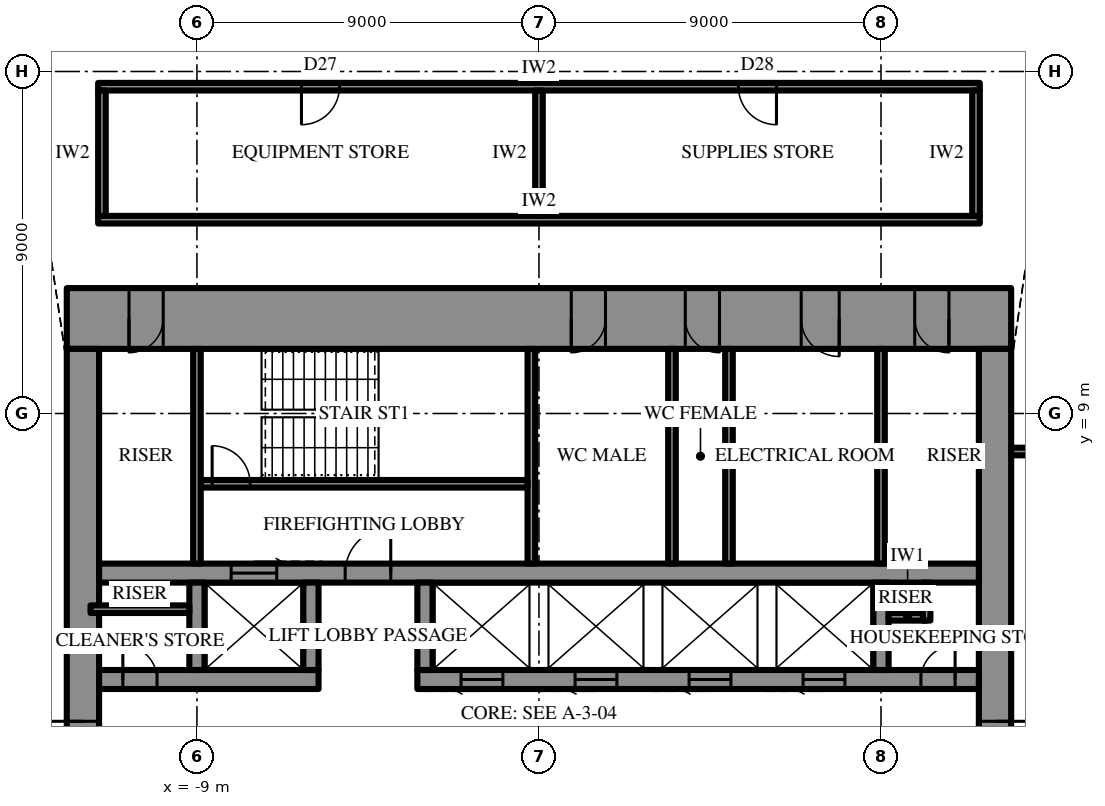
"""IFC4 building model, lengths in metres.
Left out: names, types, materials, properties, quantities, classifications, styles, units other than length and angle.
Written with IfcOpenShell. Run it as: python <this file> out.ifc"""

import sys

from ifc_helpers import new_model, si_unit, direction, frame, frame_2d, origin, place, context, subcontext, project, spatial, rectangle, extrude, element, fill, save


model = new_model("IFC4")
c1 = context("Model", 3, precision=1e-05, world=origin(), true_north=direction((0.0, 1.0)))
c2 = subcontext(c1, "Body", "Model", "MODEL_VIEW")
j1 = project(units=[si_unit("LENGTHUNIT", "METRE"), si_unit("PLANEANGLEUNIT", "RADIAN")], contexts=[c1])
p1 = place(None, origin())
s1 = spatial("IfcSite", under=j1, at=p1, CompositionType="ELEMENT")
p2 = place(p1, origin())
s2 = spatial("IfcBuilding", under=s1, at=p2, CompositionType="ELEMENT")
p3 = place(p2, frame((0.0, 0.0, 353.5)))
s3 = spatial("IfcBuildingStorey", under=s2, at=p3, CompositionType="ELEMENT", Elevation=353.5)
p4 = place(p3, frame((-12.425, 11.5, 0.0), z_axis=(0.0, 0.0, 1.0), x_axis=(1.0, 0.0, 0.0)))
e1 = element("IfcWall", 1, at=p4, inside=s3, PredefinedType="SHEAR", context=c2, shape_type="SweptSolid", body=[
    extrude(rectangle(XDim=24.85, YDim=1.6, at=frame_2d((12.425, 0.0))), origin(), (0.0, 0.0, 1.0), 4.2),
])
p5 = place(p4, frame((13.275, 0.0, 0.0)))
e2 = element("IfcOpeningElement", 2, at=p5, cuts=e1, PredefinedType="OPENING", context=c2, shape_type="SweptSolid", body=[
    extrude(rectangle(XDim=0.9, YDim=2.2, at=frame_2d((0.45, 1.1))), frame((0.0, 0.81, 0.0), z_axis=(0.0, -1.0, 0.0), x_axis=(1.0, 0.0, 0.0)), (0.0, 0.0, 1.0), 1.62),
])
p6 = place(p4, frame((16.275, 0.0, 0.0)))
e3 = element("IfcOpeningElement", 3, at=p6, cuts=e1, PredefinedType="OPENING", context=c2, shape_type="SweptSolid", body=[
    extrude(rectangle(XDim=0.9, YDim=2.2, at=frame_2d((0.45, 1.1))), frame((0.0, 0.81, 0.0), z_axis=(0.0, -1.0, 0.0), x_axis=(1.0, 0.0, 0.0)), (0.0, 0.0, 1.0), 1.62),
])
p7 = place(p4, frame((19.325, 0.0, 0.0)))
e4 = element("IfcOpeningElement", 4, at=p7, cuts=e1, PredefinedType="OPENING", context=c2, shape_type="SweptSolid", body=[
    extrude(rectangle(XDim=1.0, YDim=2.2, at=frame_2d((0.5, 1.1))), frame((0.0, 0.81, 0.0), z_axis=(0.0, -1.0, 0.0), x_axis=(1.0, 0.0, 0.0)), (0.0, 0.0, 1.0), 1.62),
])
p8 = place(p4, frame((1.637, 0.0, 0.0)))
e5 = element("IfcOpeningElement", 5, at=p8, cuts=e1, PredefinedType="OPENING", context=c2, shape_type="SweptSolid", body=[
    extrude(rectangle(XDim=0.9, YDim=2.2, at=frame_2d((0.45, 1.1))), frame((0.0, 0.81, 0.0), z_axis=(0.0, -1.0, 0.0), x_axis=(1.0, 0.0, 0.0)), (0.0, 0.0, 1.0), 1.62),
])
p9 = place(p4, frame((22.312, 0.0, 0.0)))
e6 = element("IfcOpeningElement", 6, at=p9, cuts=e1, PredefinedType="OPENING", context=c2, shape_type="SweptSolid", body=[
    extrude(rectangle(XDim=0.9, YDim=2.2, at=frame_2d((0.45, 1.1))), frame((0.0, 0.81, 0.0), z_axis=(0.0, -1.0, 0.0), x_axis=(1.0, 0.0, 0.0)), (0.0, 0.0, 1.0), 1.62),
])
p10 = place(p3, frame((12.0, -10.7, 0.0), z_axis=(0.0, 0.0, 1.0), x_axis=(0.0, 1.0, 0.0)))
e7 = element("IfcWall", 7, at=p10, inside=s3, PredefinedType="SHEAR", context=c2, shape_type="SweptSolid", body=[
    extrude(rectangle(XDim=21.4, YDim=0.85, at=frame_2d((10.7, 0.0))), origin(), (0.0, 0.0, 1.0), 4.2),
])
p11 = place(p10, frame((9.8, 0.0, 0.0)))
e8 = element("IfcOpeningElement", 8, at=p11, cuts=e7, PredefinedType="OPENING", context=c2, shape_type="SweptSolid", body=[
    extrude(rectangle(XDim=1.8, YDim=2.4, at=frame_2d((0.9, 1.2))), frame((0.0, 0.435, 0.0), z_axis=(0.0, -1.0, 0.0), x_axis=(1.0, 0.0, 0.0)), (0.0, 0.0, 1.0), 0.87),
])
p12 = place(p3, frame((-12.0, 10.7, 0.0), z_axis=(0.0, 0.0, 1.0), x_axis=(0.0, -1.0, 0.0)))
e9 = element("IfcWall", 9, at=p12, inside=s3, PredefinedType="SHEAR", context=c2, shape_type="SweptSolid", body=[
    extrude(rectangle(XDim=21.4, YDim=0.85, at=frame_2d((10.7, 0.0))), origin(), (0.0, 0.0, 1.0), 4.2),
])
p13 = place(p12, frame((9.8, 0.0, 0.0)))
e10 = element("IfcOpeningElement", 10, at=p13, cuts=e9, PredefinedType="OPENING", context=c2, shape_type="SweptSolid", body=[
    extrude(rectangle(XDim=1.8, YDim=2.4, at=frame_2d((0.9, 1.2))), frame((0.0, 0.435, 0.0), z_axis=(0.0, -1.0, 0.0), x_axis=(1.0, 0.0, 0.0)), (0.0, 0.0, 1.0), 0.87),
])
p14 = place(p3, frame((-11.575, 2.0, 0.0), z_axis=(0.0, 0.0, 1.0), x_axis=(1.0, 0.0, 0.0)))
e11 = element("IfcWall", 11, at=p14, inside=s3, PredefinedType="SHEAR", context=c2, shape_type="SweptSolid", body=[
    extrude(rectangle(XDim=5.775, YDim=0.5, at=frame_2d((2.887, 0.0))), origin(), (0.0, 0.0, 1.0), 4.2),
])
p15 = place(p14, frame((0.625, 0.0, 0.0)))
e12 = element("IfcOpeningElement", 12, at=p15, cuts=e11, PredefinedType="OPENING", context=c2, shape_type="SweptSolid", body=[
    extrude(rectangle(XDim=0.9, YDim=2.2, at=frame_2d((0.45, 1.1))), frame((0.0, 0.26, 0.0), z_axis=(0.0, -1.0, 0.0), x_axis=(1.0, 0.0, 0.0)), (0.0, 0.0, 1.0), 0.52),
])
p16 = place(p3, frame((-3.2, 2.0, 0.0), z_axis=(0.0, 0.0, 1.0), x_axis=(1.0, 0.0, 0.0)))
e13 = element("IfcWall", 13, at=p16, inside=s3, PredefinedType="SHEAR", context=c2, shape_type="SweptSolid", body=[
    extrude(rectangle(XDim=14.775, YDim=0.5, at=frame_2d((7.387, 0.0))), origin(), (0.0, 0.0, 1.0), 4.2),
])
p17 = place(p16, frame((13.25, 0.0, 0.0)))
e14 = element("IfcOpeningElement", 14, at=p17, cuts=e13, PredefinedType="OPENING", context=c2, shape_type="SweptSolid", body=[
    extrude(rectangle(XDim=0.9, YDim=2.2, at=frame_2d((0.45, 1.1))), frame((0.0, 0.26, 0.0), z_axis=(0.0, -1.0, 0.0), x_axis=(1.0, 0.0, 0.0)), (0.0, 0.0, 1.0), 0.52),
])
p18 = place(p16, frame((1.15, 0.0, 0.0)))
e15 = element("IfcOpeningElement", 15, at=p18, cuts=e13, PredefinedType="OPENING", context=c2, shape_type="SweptSolid", body=[
    extrude(rectangle(XDim=1.1, YDim=2.2, at=frame_2d((0.55, 1.1))), frame((0.0, 0.26, 0.0), z_axis=(0.0, -1.0, 0.0), x_axis=(1.0, 0.0, 0.0)), (0.0, 0.0, 1.0), 0.52),
])
p19 = place(p16, frame((4.15, 0.0, 0.0)))
e16 = element("IfcOpeningElement", 16, at=p19, cuts=e13, PredefinedType="OPENING", context=c2, shape_type="SweptSolid", body=[
    extrude(rectangle(XDim=1.1, YDim=2.2, at=frame_2d((0.55, 1.1))), frame((0.0, 0.26, 0.0), z_axis=(0.0, -1.0, 0.0), x_axis=(1.0, 0.0, 0.0)), (0.0, 0.0, 1.0), 0.52),
])
p20 = place(p16, frame((7.15, 0.0, 0.0)))
e17 = element("IfcOpeningElement", 17, at=p20, cuts=e13, PredefinedType="OPENING", context=c2, shape_type="SweptSolid", body=[
    extrude(rectangle(XDim=1.1, YDim=2.2, at=frame_2d((0.55, 1.1))), frame((0.0, 0.26, 0.0), z_axis=(0.0, -1.0, 0.0), x_axis=(1.0, 0.0, 0.0)), (0.0, 0.0, 1.0), 0.52),
])
p21 = place(p16, frame((10.15, 0.0, 0.0)))
e18 = element("IfcOpeningElement", 18, at=p21, cuts=e13, PredefinedType="OPENING", context=c2, shape_type="SweptSolid", body=[
    extrude(rectangle(XDim=1.1, YDim=2.2, at=frame_2d((0.55, 1.1))), frame((0.0, 0.26, 0.0), z_axis=(0.0, -1.0, 0.0), x_axis=(1.0, 0.0, 0.0)), (0.0, 0.0, 1.0), 0.52),
])
p22 = place(p3, frame((-11.575, 4.8, 0.0), z_axis=(0.0, 0.0, 1.0), x_axis=(1.0, 0.0, 0.0)))
e19 = element("IfcWall", 19, at=p22, inside=s3, PredefinedType="SHEAR", context=c2, shape_type="SweptSolid", body=[
    extrude(rectangle(XDim=23.15, YDim=0.5, at=frame_2d((11.575, 0.0))), origin(), (0.0, 0.0, 1.0), 4.2),
])
p23 = place(p22, frame((6.475, 0.0, 0.0)))
e20 = element("IfcOpeningElement", 20, at=p23, cuts=e19, PredefinedType="OPENING", context=c2, shape_type="SweptSolid", body=[
    extrude(rectangle(XDim=1.2, YDim=2.2, at=frame_2d((0.6, 1.1))), frame((0.0, 0.26, 0.0), z_axis=(0.0, -1.0, 0.0), x_axis=(1.0, 0.0, 0.0)), (0.0, 0.0, 1.0), 0.52),
])
p24 = place(p22, frame((3.475, 0.0, 0.0)))
e21 = element("IfcOpeningElement", 21, at=p24, cuts=e19, PredefinedType="OPENING", context=c2, shape_type="SweptSolid", body=[
    extrude(rectangle(XDim=1.2, YDim=2.2, at=frame_2d((0.6, 1.1))), frame((0.0, 0.26, 0.0), z_axis=(0.0, -1.0, 0.0), x_axis=(1.0, 0.0, 0.0)), (0.0, 0.0, 1.0), 0.52),
])
for number, where, z_axis, x_axis in (
    (22, (-9.0, 2.25, 0.0), (0.0, 0.0, 1.0), (0.0, 1.0, 0.0)),
    (23, (-6.0, 2.25, 0.0), (0.0, 0.0, 1.0), (0.0, 1.0, 0.0)),
    (24, (-3.0, 2.25, 0.0), (0.0, 0.0, 1.0), (0.0, 1.0, 0.0)),
    (25, (9.0, 2.25, 0.0), (0.0, 0.0, 1.0), (0.0, 1.0, 0.0)),
):
    element("IfcWall", number, at=place(p3, frame(where, z_axis=z_axis, x_axis=x_axis)), inside=s3, PredefinedType="SHEAR", context=c2, shape_type="SweptSolid", body=[
        extrude(rectangle(XDim=2.3, YDim=0.4, at=frame_2d((1.15, 0.0))), origin(), (0.0, 0.0, 1.0), 4.2),
    ])
p25 = place(p3, frame((-0.2, 5.05, 0.0), z_axis=(0.0, 0.0, 1.0), x_axis=(0.0, 1.0, 0.0)))
e26 = element("IfcWall", 26, at=p25, inside=s3, PredefinedType="SHEAR", context=c2, shape_type="SweptSolid", body=[
    extrude(rectangle(XDim=5.65, YDim=0.2, at=frame_2d((2.825, 0.0))), origin(), (0.0, 0.0, 1.0), 4.2),
])
p26 = place(p3, frame((-8.9, 7.15, 0.0), z_axis=(0.0, 0.0, 1.0), x_axis=(1.0, 0.0, 0.0)))
e27 = element("IfcWall", 27, at=p26, inside=s3, PredefinedType="SHEAR", context=c2, shape_type="SweptSolid", body=[
    extrude(rectangle(XDim=8.6, YDim=0.2, at=frame_2d((4.3, 0.0))), origin(), (0.0, 0.0, 1.0), 4.2),
])
p27 = place(p26, frame((0.3, 0.0, 0.0)))
e28 = element("IfcOpeningElement", 28, at=p27, cuts=e27, PredefinedType="OPENING", context=c2, shape_type="SweptSolid", body=[
    extrude(rectangle(XDim=1.0, YDim=2.2, at=frame_2d((0.5, 1.1))), frame((0.0, 0.11, 0.0), z_axis=(0.0, -1.0, 0.0), x_axis=(1.0, 0.0, 0.0)), (0.0, 0.0, 1.0), 0.22),
])
for number, where, z_axis, x_axis in (
    (29, (-9.0, 5.05, 0.0), (0.0, 0.0, 1.0), (0.0, 1.0, 0.0)),
    (30, (9.0, 5.05, 0.0), (0.0, 0.0, 1.0), (0.0, 1.0, 0.0)),
    (31, (3.5, 5.05, 0.0), (0.0, 0.0, 1.0), (0.0, 1.0, 0.0)),
    (32, (5.0, 5.05, 0.0), (0.0, 0.0, 1.0), (0.0, 1.0, 0.0)),
):
    element("IfcWall", number, at=place(p3, frame(where, z_axis=z_axis, x_axis=x_axis)), inside=s3, PredefinedType="PARTITIONING", context=c2, shape_type="SweptSolid", body=[
        extrude(rectangle(XDim=5.65, YDim=0.2, at=frame_2d((2.825, 0.0))), origin(), (0.0, 0.0, 1.0), 4.0),
    ])
p28 = place(p3, frame((-11.8, 3.85, 0.0), z_axis=(0.0, 0.0, 1.0), x_axis=(1.0, 0.0, 0.0)))
e33 = element("IfcWall", 33, at=p28, inside=s3, PredefinedType="PARTITIONING", context=c2, shape_type="SweptSolid", body=[
    extrude(rectangle(XDim=2.6, YDim=0.2, at=frame_2d((1.3, 0.0))), origin(), (0.0, 0.0, 1.0), 4.0),
])
for number, where, z_axis, x_axis in (
    (34, (9.2, 3.65, 0.0), (0.0, 0.0, 1.0), (1.0, 0.0, 0.0)),
    (35, (10.2, 3.55, 0.0), (0.0, 0.0, 1.0), (0.0, 1.0, 0.0)),
):
    element("IfcWall", number, at=place(p3, frame(where, z_axis=z_axis, x_axis=x_axis)), inside=s3, PredefinedType="PARTITIONING", context=c2, shape_type="SweptSolid", body=[
        extrude(rectangle(XDim=1.0, YDim=0.2, at=frame_2d((0.5, 0.0))), origin(), (0.0, 0.0, 1.0), 4.0),
    ])
p29 = place(p3, frame((-11.6, 14.1, 0.0), z_axis=(0.0, 0.0, 1.0), x_axis=(1.0, 0.0, 0.0)))
e36 = element("IfcWall", 36, at=p29, inside=s3, PredefinedType="PARTITIONING", context=c2, shape_type="SweptSolid", body=[
    extrude(rectangle(XDim=23.2, YDim=0.2, at=frame_2d((11.6, 0.0))), origin(), (0.0, 0.0, 1.0), 4.0),
])
p30 = place(p3, frame((-11.6, 17.6, 0.0), z_axis=(0.0, 0.0, 1.0), x_axis=(1.0, 0.0, 0.0)))
e37 = element("IfcWall", 37, at=p30, inside=s3, PredefinedType="PARTITIONING", context=c2, shape_type="SweptSolid", body=[
    extrude(rectangle(XDim=23.2, YDim=0.2, at=frame_2d((11.6, 0.0))), origin(), (0.0, 0.0, 1.0), 4.0),
])
p31 = place(p30, frame((5.35, 0.0, 0.0)))
e38 = element("IfcOpeningElement", 38, at=p31, cuts=e37, PredefinedType="OPENING", context=c2, shape_type="SweptSolid", body=[
    extrude(rectangle(XDim=1.0, YDim=2.2, at=frame_2d((0.5, 1.1))), frame((0.0, 0.11, 0.0), z_axis=(0.0, -1.0, 0.0), x_axis=(1.0, 0.0, 0.0)), (0.0, 0.0, 1.0), 0.22),
])
p32 = place(p30, frame((16.85, 0.0, 0.0)))
e39 = element("IfcOpeningElement", 39, at=p32, cuts=e37, PredefinedType="OPENING", context=c2, shape_type="SweptSolid", body=[
    extrude(rectangle(XDim=1.0, YDim=2.2, at=frame_2d((0.5, 1.1))), frame((0.0, 0.11, 0.0), z_axis=(0.0, -1.0, 0.0), x_axis=(1.0, 0.0, 0.0)), (0.0, 0.0, 1.0), 0.22),
])
p33 = place(p3, frame((-11.5, 14.2, 0.0), z_axis=(0.0, 0.0, 1.0), x_axis=(0.0, 1.0, 0.0)))
e40 = element("IfcWall", 40, at=p33, inside=s3, PredefinedType="PARTITIONING", context=c2, shape_type="SweptSolid", body=[
    extrude(rectangle(XDim=3.3, YDim=0.2, at=frame_2d((1.65, 0.0))), origin(), (0.0, 0.0, 1.0), 4.0),
])
p34 = place(p3, frame((0.0, 14.2, 0.0), z_axis=(0.0, 0.0, 1.0), x_axis=(0.0, 1.0, 0.0)))
e41 = element("IfcWall", 41, at=p34, inside=s3, PredefinedType="PARTITIONING", context=c2, shape_type="SweptSolid", body=[
    extrude(rectangle(XDim=3.3, YDim=0.2, at=frame_2d((1.65, 0.0))), origin(), (0.0, 0.0, 1.0), 2.992),
])
p35 = place(p3, frame((11.5, 14.2, 0.0), z_axis=(0.0, 0.0, 1.0), x_axis=(0.0, 1.0, 0.0)))
e42 = element("IfcWall", 42, at=p35, inside=s3, PredefinedType="PARTITIONING", context=c2, shape_type="SweptSolid", body=[
    extrude(rectangle(XDim=3.3, YDim=0.2, at=frame_2d((1.65, 0.0))), origin(), (0.0, 0.0, 1.0), 4.0),
])
p36 = place(p3, frame((12.425, 8.0, 0.0), z_axis=(0.0, 0.0, 1.0), x_axis=(1.0, 0.0, 0.0)))
e43 = element("IfcWall", 43, at=p36, inside=s3, PredefinedType="PARTITIONING", context=c2, shape_type="SweptSolid", body=[
    extrude(rectangle(XDim=13.59, YDim=0.2, at=frame_2d((6.795, 0.0))), origin(), (0.0, 0.0, 1.0), 4.0),
])
p37 = place(p36, frame((0.859, 0.0, 0.0)))
e44 = element("IfcOpeningElement", 44, at=p37, cuts=e43, PredefinedType="OPENING", context=c2, shape_type="SweptSolid", body=[
    extrude(rectangle(XDim=1.0, YDim=2.2, at=frame_2d((0.5, 1.1))), frame((0.0, 0.11, 0.0), z_axis=(0.0, -1.0, 0.0), x_axis=(1.0, 0.0, 0.0)), (0.0, 0.0, 1.0), 0.22),
])
p38 = place(p11, frame((1.8, 0.0, 0.0), z_axis=(0.0, 0.0, 1.0), x_axis=(-1.0, 0.0, 0.0)))
e45 = element("IfcDoor", 45, at=p38, inside=s3, OperationType="DOUBLE_DOOR_SINGLE_SWING", PredefinedType="DOOR", context=c2, shape_type="SweptSolid", body=[
    extrude(rectangle(XDim=1.8, YDim=2.4, at=frame_2d((0.9, 1.2))), frame((0.0, 0.025, 0.0), z_axis=(0.0, -1.0, 0.0), x_axis=(1.0, 0.0, 0.0)), (0.0, 0.0, 1.0), 0.05),
])
fill(e8, e45)
p39 = place(p13, frame((1.8, 0.0, 0.0), z_axis=(0.0, 0.0, 1.0), x_axis=(-1.0, 0.0, 0.0)))
e46 = element("IfcDoor", 46, at=p39, inside=s3, OperationType="DOUBLE_DOOR_SINGLE_SWING", PredefinedType="DOOR", context=c2, shape_type="SweptSolid", body=[
    extrude(rectangle(XDim=1.8, YDim=2.4, at=frame_2d((0.9, 1.2))), frame((0.0, 0.025, 0.0), z_axis=(0.0, -1.0, 0.0), x_axis=(1.0, 0.0, 0.0)), (0.0, 0.0, 1.0), 0.05),
])
fill(e10, e46)
p40 = place(p23, origin())
e47 = element("IfcDoor", 47, at=p40, inside=s3, OperationType="SINGLE_SWING_LEFT", PredefinedType="DOOR", context=c2, shape_type="SweptSolid", body=[
    extrude(rectangle(XDim=1.2, YDim=2.2, at=frame_2d((0.6, 1.1))), frame((0.0, 0.025, 0.0), z_axis=(0.0, -1.0, 0.0), x_axis=(1.0, 0.0, 0.0)), (0.0, 0.0, 1.0), 0.05),
])
fill(e20, e47)
p41 = place(p27, origin())
e48 = element("IfcDoor", 48, at=p41, inside=s3, OperationType="SINGLE_SWING_RIGHT", PredefinedType="DOOR", context=c2, shape_type="SweptSolid", body=[
    extrude(rectangle(XDim=1.0, YDim=2.2, at=frame_2d((0.5, 1.1))), frame((0.0, 0.025, 0.0), z_axis=(0.0, -1.0, 0.0), x_axis=(1.0, 0.0, 0.0)), (0.0, 0.0, 1.0), 0.05),
])
fill(e28, e48)
p42 = place(p5, frame((0.9, 0.0, 0.0), z_axis=(0.0, 0.0, 1.0), x_axis=(-1.0, 0.0, 0.0)))
e49 = element("IfcDoor", 49, at=p42, inside=s3, OperationType="SINGLE_SWING_LEFT", PredefinedType="DOOR", context=c2, shape_type="SweptSolid", body=[
    extrude(rectangle(XDim=0.9, YDim=2.2, at=frame_2d((0.45, 1.1))), frame((0.0, 0.025, 0.0), z_axis=(0.0, -1.0, 0.0), x_axis=(1.0, 0.0, 0.0)), (0.0, 0.0, 1.0), 0.05),
])
fill(e2, e49)
p43 = place(p6, frame((0.9, 0.0, 0.0), z_axis=(0.0, 0.0, 1.0), x_axis=(-1.0, 0.0, 0.0)))
e50 = element("IfcDoor", 50, at=p43, inside=s3, OperationType="SINGLE_SWING_RIGHT", PredefinedType="DOOR", context=c2, shape_type="SweptSolid", body=[
    extrude(rectangle(XDim=0.9, YDim=2.2, at=frame_2d((0.45, 1.1))), frame((0.0, 0.025, 0.0), z_axis=(0.0, -1.0, 0.0), x_axis=(1.0, 0.0, 0.0)), (0.0, 0.0, 1.0), 0.05),
])
fill(e3, e50)
p44 = place(p7, frame((1.0, 0.0, 0.0), z_axis=(0.0, 0.0, 1.0), x_axis=(-1.0, 0.0, 0.0)))
e51 = element("IfcDoor", 51, at=p44, inside=s3, OperationType="SINGLE_SWING_RIGHT", PredefinedType="DOOR", context=c2, shape_type="SweptSolid", body=[
    extrude(rectangle(XDim=1.0, YDim=2.2, at=frame_2d((0.5, 1.1))), frame((0.0, 0.025, 0.0), z_axis=(0.0, -1.0, 0.0), x_axis=(1.0, 0.0, 0.0)), (0.0, 0.0, 1.0), 0.05),
])
fill(e4, e51)
p45 = place(p8, frame((0.9, 0.0, 0.0), z_axis=(0.0, 0.0, 1.0), x_axis=(-1.0, 0.0, 0.0)))
e52 = element("IfcDoor", 52, at=p45, inside=s3, OperationType="SINGLE_SWING_LEFT", PredefinedType="DOOR", context=c2, shape_type="SweptSolid", body=[
    extrude(rectangle(XDim=0.9, YDim=2.2, at=frame_2d((0.45, 1.1))), frame((0.0, 0.025, 0.0), z_axis=(0.0, -1.0, 0.0), x_axis=(1.0, 0.0, 0.0)), (0.0, 0.0, 1.0), 0.05),
])
fill(e5, e52)
p46 = place(p9, frame((0.9, 0.0, 0.0), z_axis=(0.0, 0.0, 1.0), x_axis=(-1.0, 0.0, 0.0)))
e53 = element("IfcDoor", 53, at=p46, inside=s3, OperationType="SINGLE_SWING_RIGHT", PredefinedType="DOOR", context=c2, shape_type="SweptSolid", body=[
    extrude(rectangle(XDim=0.9, YDim=2.2, at=frame_2d((0.45, 1.1))), frame((0.0, 0.025, 0.0), z_axis=(0.0, -1.0, 0.0), x_axis=(1.0, 0.0, 0.0)), (0.0, 0.0, 1.0), 0.05),
])
fill(e6, e53)
p47 = place(p15, origin())
e54 = element("IfcDoor", 54, at=p47, inside=s3, OperationType="SINGLE_SWING_RIGHT", PredefinedType="DOOR", context=c2, shape_type="SweptSolid", body=[
    extrude(rectangle(XDim=0.9, YDim=2.2, at=frame_2d((0.45, 1.1))), frame((0.0, 0.025, 0.0), z_axis=(0.0, -1.0, 0.0), x_axis=(1.0, 0.0, 0.0)), (0.0, 0.0, 1.0), 0.05),
])
fill(e12, e54)
p48 = place(p17, origin())
e55 = element("IfcDoor", 55, at=p48, inside=s3, OperationType="SINGLE_SWING_LEFT", PredefinedType="DOOR", context=c2, shape_type="SweptSolid", body=[
    extrude(rectangle(XDim=0.9, YDim=2.2, at=frame_2d((0.45, 1.1))), frame((0.0, 0.025, 0.0), z_axis=(0.0, -1.0, 0.0), x_axis=(1.0, 0.0, 0.0)), (0.0, 0.0, 1.0), 0.05),
])
fill(e14, e55)
p49 = place(p24, origin())
e56 = element("IfcDoor", 56, at=p49, inside=s3, OperationType="SLIDING_TO_LEFT", PredefinedType="DOOR", context=c2, shape_type="SweptSolid", body=[
    extrude(rectangle(XDim=1.2, YDim=2.2, at=frame_2d((0.6, 1.1))), frame((0.0, 0.025, 0.0), z_axis=(0.0, -1.0, 0.0), x_axis=(1.0, 0.0, 0.0)), (0.0, 0.0, 1.0), 0.05),
])
fill(e21, e56)
p50 = place(p18, frame((1.1, 0.0, 0.0), z_axis=(0.0, 0.0, 1.0), x_axis=(-1.0, 0.0, 0.0)))
e57 = element("IfcDoor", 57, at=p50, inside=s3, OperationType="SLIDING_TO_LEFT", PredefinedType="DOOR", context=c2, shape_type="SweptSolid", body=[
    extrude(rectangle(XDim=1.1, YDim=2.2, at=frame_2d((0.55, 1.1))), frame((0.0, 0.025, 0.0), z_axis=(0.0, -1.0, 0.0), x_axis=(1.0, 0.0, 0.0)), (0.0, 0.0, 1.0), 0.05),
])
fill(e15, e57)
p51 = place(p19, frame((1.1, 0.0, 0.0), z_axis=(0.0, 0.0, 1.0), x_axis=(-1.0, 0.0, 0.0)))
e58 = element("IfcDoor", 58, at=p51, inside=s3, OperationType="SLIDING_TO_LEFT", PredefinedType="DOOR", context=c2, shape_type="SweptSolid", body=[
    extrude(rectangle(XDim=1.1, YDim=2.2, at=frame_2d((0.55, 1.1))), frame((0.0, 0.025, 0.0), z_axis=(0.0, -1.0, 0.0), x_axis=(1.0, 0.0, 0.0)), (0.0, 0.0, 1.0), 0.05),
])
fill(e16, e58)
p52 = place(p20, frame((1.1, 0.0, 0.0), z_axis=(0.0, 0.0, 1.0), x_axis=(-1.0, 0.0, 0.0)))
e59 = element("IfcDoor", 59, at=p52, inside=s3, OperationType="SLIDING_TO_LEFT", PredefinedType="DOOR", context=c2, shape_type="SweptSolid", body=[
    extrude(rectangle(XDim=1.1, YDim=2.2, at=frame_2d((0.55, 1.1))), frame((0.0, 0.025, 0.0), z_axis=(0.0, -1.0, 0.0), x_axis=(1.0, 0.0, 0.0)), (0.0, 0.0, 1.0), 0.05),
])
fill(e17, e59)
p53 = place(p21, frame((1.1, 0.0, 0.0), z_axis=(0.0, 0.0, 1.0), x_axis=(-1.0, 0.0, 0.0)))
e60 = element("IfcDoor", 60, at=p53, inside=s3, OperationType="SLIDING_TO_LEFT", PredefinedType="DOOR", context=c2, shape_type="SweptSolid", body=[
    extrude(rectangle(XDim=1.1, YDim=2.2, at=frame_2d((0.55, 1.1))), frame((0.0, 0.025, 0.0), z_axis=(0.0, -1.0, 0.0), x_axis=(1.0, 0.0, 0.0)), (0.0, 0.0, 1.0), 0.05),
])
fill(e18, e60)
p54 = place(p31, frame((1.0, 0.0, 0.0), z_axis=(0.0, 0.0, 1.0), x_axis=(-1.0, 0.0, 0.0)))
e61 = element("IfcDoor", 61, at=p54, inside=s3, OperationType="SINGLE_SWING_LEFT", PredefinedType="DOOR", context=c2, shape_type="SweptSolid", body=[
    extrude(rectangle(XDim=1.0, YDim=2.2, at=frame_2d((0.5, 1.1))), frame((0.0, 0.025, 0.0), z_axis=(0.0, -1.0, 0.0), x_axis=(1.0, 0.0, 0.0)), (0.0, 0.0, 1.0), 0.05),
])
fill(e38, e61)
p55 = place(p32, frame((1.0, 0.0, 0.0), z_axis=(0.0, 0.0, 1.0), x_axis=(-1.0, 0.0, 0.0)))
e62 = element("IfcDoor", 62, at=p55, inside=s3, OperationType="SINGLE_SWING_RIGHT", PredefinedType="DOOR", context=c2, shape_type="SweptSolid", body=[
    extrude(rectangle(XDim=1.0, YDim=2.2, at=frame_2d((0.5, 1.1))), frame((0.0, 0.025, 0.0), z_axis=(0.0, -1.0, 0.0), x_axis=(1.0, 0.0, 0.0)), (0.0, 0.0, 1.0), 0.05),
])
fill(e39, e62)
save(model, sys.argv[1])
